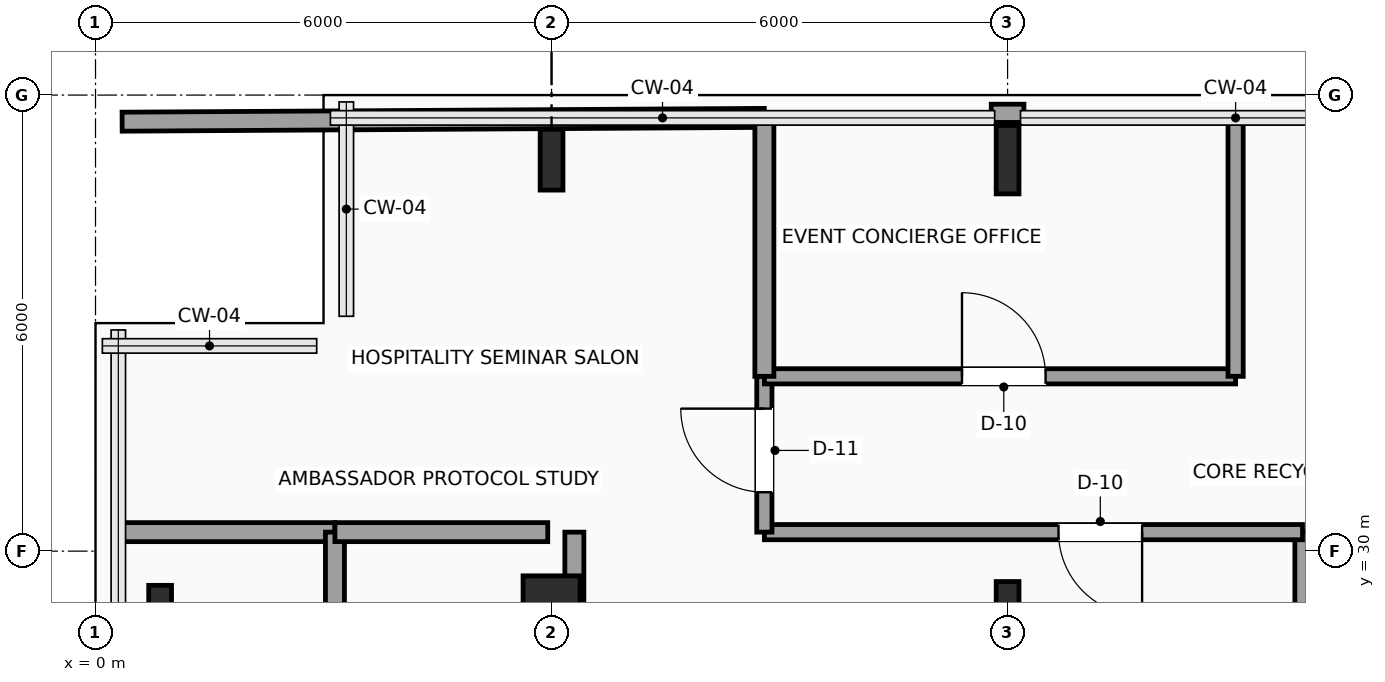
"""IFC4 building model, lengths in metres.
Left out: names, types, materials, properties, quantities, classifications, styles, units other than length and angle.
Written with IfcOpenShell. Run it as: python <this file> out.ifc"""

import sys

from ifc_helpers import new_model, si_unit, direction, frame, frame_2d, origin, origin_2d, place, context, subcontext, project, spatial, rectangle, i_section, extrude, element, fill, save


model = new_model("IFC4")
c1 = context("Model", 3, precision=1e-05, world=origin(), true_north=direction((0.0, 1.0)))
c2 = subcontext(c1, "Body", "Model", "MODEL_VIEW")
j1 = project(units=[si_unit("LENGTHUNIT", "METRE"), si_unit("PLANEANGLEUNIT", "RADIAN")], contexts=[c1])
p1 = place(None, origin())
s1 = spatial("IfcSite", under=j1, at=p1, CompositionType="ELEMENT")
p2 = place(p1, origin())
s2 = spatial("IfcBuilding", under=s1, at=p2, CompositionType="ELEMENT")
p3 = place(p2, frame((0.0, 0.0, 187.95)))
s3 = spatial("IfcBuildingStorey", under=s2, at=p3, CompositionType="ELEMENT", Elevation=187.95)
p4 = place(p3, frame((0.85, 29.15, 0.0), z_axis=(0.0, 0.0, 1.0), x_axis=(1.0, 0.0, 0.0)))
e1 = element("IfcColumn", 1, at=p4, inside=s3, PredefinedType="COLUMN", context=c2, shape_type="SweptSolid", body=[
    extrude(i_section(OverallWidth=0.3, OverallDepth=0.8, WebThickness=0.018, FlangeThickness=0.033, FilletRadius=0.03, at=origin_2d()), origin(), (0.0, 0.0, 1.0), 3.75),
])
p5 = place(p3, frame((6.0, 29.15, 0.0), z_axis=(0.0, 0.0, 1.0), x_axis=(1.0, 0.0, 0.0)))
e2 = element("IfcColumn", 2, at=p5, inside=s3, PredefinedType="COLUMN", context=c2, shape_type="SweptSolid", body=[
    extrude(rectangle(XDim=0.75, YDim=1.05, at=origin_2d()), origin(), (0.0, 0.0, 1.0), 3.75),
])
p6 = place(p3, frame((6.0, 35.15, 0.0), z_axis=(0.0, 0.0, 1.0), x_axis=(1.0, 0.0, 0.0)))
e3 = element("IfcColumn", 3, at=p6, inside=s3, PredefinedType="COLUMN", context=c2, shape_type="SweptSolid", body=[
    extrude(i_section(OverallWidth=0.3, OverallDepth=0.8, WebThickness=0.018, FlangeThickness=0.033, FilletRadius=0.03, at=origin_2d()), origin(), (0.0, 0.0, 1.0), 3.75),
])
for number, where, z_axis, x_axis in (
    (4, (12.0, 29.15, 0.0), (0.0, 0.0, 1.0), (1.0, 0.0, 0.0)),
    (5, (12.0, 35.15, 0.0), (0.0, 0.0, 1.0), (1.0, 0.0, 0.0)),
):
    element("IfcColumn", number, at=place(p3, frame(where, z_axis=z_axis, x_axis=x_axis)), inside=s3, PredefinedType="COLUMN", context=c2, shape_type="SweptSolid", body=[
        extrude(i_section(OverallWidth=0.3, OverallDepth=0.9, WebThickness=0.019, FlangeThickness=0.035, FilletRadius=0.03, at=origin_2d()), origin(), (0.0, 0.0, 1.0), 3.75),
    ])
p7 = place(p3, frame((11.785, 35.76, 0.0), z_axis=(0.0, 0.0, 1.0), x_axis=(1.0, 0.0, 0.0)))
e6 = element("IfcWall", 6, at=p7, inside=s3, PredefinedType="SOLIDWALL", context=c2, shape_type="SweptSolid", body=[
    extrude(rectangle(XDim=0.43, YDim=0.24, at=frame_2d((0.215, 0.0))), origin(), (0.0, 0.0, 1.0), 3.54),
])
p8 = place(p3, frame((15.88, 27.58, 0.0), z_axis=(0.0, 0.0, 1.0), x_axis=(0.0, 1.0, 0.0)))
e7 = element("IfcWall", 7, at=p8, inside=s3, PredefinedType="SOLIDWALL", context=c2, shape_type="SweptSolid", body=[
    extrude(rectangle(XDim=2.67, YDim=0.2, at=frame_2d((1.335, 0.0))), origin(), (0.0, 0.0, 1.0), 3.54),
])
p9 = place(p3, frame((15.88, 30.25, 0.0), z_axis=(0.0, 0.0, 1.0), x_axis=(-1.0, 0.0, 0.0)))
e8 = element("IfcWall", 8, at=p9, inside=s3, PredefinedType="SOLIDWALL", context=c2, shape_type="SweptSolid", body=[
    extrude(rectangle(XDim=7.08, YDim=0.2, at=frame_2d((3.54, 0.0))), origin(), (0.0, 0.0, 1.0), 3.54),
])
p10 = place(p9, frame((2.11, 0.0, 0.0)))
e9 = element("IfcOpeningElement", 9, at=p10, cuts=e8, PredefinedType="OPENING", context=c2, shape_type="SweptSolid", body=[
    extrude(rectangle(XDim=1.1, YDim=2.25, at=frame_2d((0.55, 1.125))), frame((0.0, 0.11, 0.0), z_axis=(0.0, -1.0, 0.0), x_axis=(1.0, 0.0, 0.0)), (0.0, 0.0, 1.0), 0.22),
])
p11 = place(p3, frame((8.8, 30.25, 0.0), z_axis=(0.0, 0.0, 1.0), x_axis=(0.0, 1.0, 0.0)))
e10 = element("IfcWall", 10, at=p11, inside=s3, PredefinedType="SOLIDWALL", context=c2, shape_type="SweptSolid", body=[
    extrude(rectangle(XDim=2.05, YDim=0.2, at=frame_2d((1.025, 0.0))), origin(), (0.0, 0.0, 1.0), 3.54),
])
p12 = place(p11, frame((0.525, 0.0, 0.0)))
e11 = element("IfcOpeningElement", 11, at=p12, cuts=e10, PredefinedType="OPENING", context=c2, shape_type="SweptSolid", body=[
    extrude(rectangle(XDim=1.1, YDim=2.25, at=frame_2d((0.55, 1.125))), frame((0.0, 0.11, 0.0), z_axis=(0.0, -1.0, 0.0), x_axis=(1.0, 0.0, 0.0)), (0.0, 0.0, 1.0), 0.22),
])
p13 = place(p3, frame((8.8, 32.3, 0.0), z_axis=(0.0, 0.0, 1.0), x_axis=(1.0, 0.0, 0.0)))
e12 = element("IfcWall", 12, at=p13, inside=s3, PredefinedType="SOLIDWALL", context=c2, shape_type="SweptSolid", body=[
    extrude(rectangle(XDim=6.2, YDim=0.2, at=frame_2d((3.1, 0.0))), origin(), (0.0, 0.0, 1.0), 3.132),
])
p14 = place(p13, frame((2.6, 0.0, 0.0)))
e13 = element("IfcOpeningElement", 13, at=p14, cuts=e12, PredefinedType="OPENING", context=c2, shape_type="SweptSolid", body=[
    extrude(rectangle(XDim=1.1, YDim=2.25, at=frame_2d((0.55, 1.125))), frame((0.0, 0.11, 0.0), z_axis=(0.0, -1.0, 0.0), x_axis=(1.0, 0.0, 0.0)), (0.0, 0.0, 1.0), 0.22),
])
p15 = place(p3, frame((15.0, 32.3, 0.0), z_axis=(0.0, 0.0, 1.0), x_axis=(0.0, 1.0, 0.0)))
e14 = element("IfcWall", 14, at=p15, inside=s3, PredefinedType="SOLIDWALL", context=c2, shape_type="SweptSolid", body=[
    extrude(rectangle(XDim=3.4, YDim=0.2, at=frame_2d((1.7, 0.0))), origin(), (0.0, 0.0, 1.0), 3.54),
])
p16 = place(p3, frame((0.3, 30.25, 0.0), z_axis=(0.0, 0.0, 1.0), x_axis=(1.0, 0.0, 0.0)))
e15 = element("IfcWall", 15, at=p16, inside=s3, PredefinedType="PARTITIONING", context=c2, shape_type="SweptSolid", body=[
    extrude(rectangle(XDim=2.85, YDim=0.25, at=frame_2d((1.425, 0.0))), origin(), (0.0, 0.0, 1.0), 3.54),
])
p17 = place(p3, frame((3.15, 18.0, 0.0), z_axis=(0.0, 0.0, 1.0), x_axis=(0.0, 1.0, 0.0)))
e16 = element("IfcWall", 16, at=p17, inside=s3, PredefinedType="PARTITIONING", context=c2, shape_type="SweptSolid", body=[
    extrude(rectangle(XDim=12.25, YDim=0.25, at=frame_2d((6.125, 0.0))), origin(), (0.0, 0.0, 1.0), 3.54),
])
p18 = place(p3, frame((3.15, 30.25, 0.0), z_axis=(0.0, 0.0, 1.0), x_axis=(1.0, 0.0, 0.0)))
e17 = element("IfcWall", 17, at=p18, inside=s3, PredefinedType="PARTITIONING", context=c2, shape_type="SweptSolid", body=[
    extrude(rectangle(XDim=2.8, YDim=0.25, at=frame_2d((1.4, 0.0))), origin(), (0.0, 0.0, 1.0), 3.54),
])
p19 = place(p3, frame((6.3, 27.65, 0.0), z_axis=(0.0, 0.0, 1.0), x_axis=(0.0, 1.0, 0.0)))
e18 = element("IfcWall", 18, at=p19, inside=s3, PredefinedType="PARTITIONING", context=c2, shape_type="SweptSolid", body=[
    extrude(rectangle(XDim=2.6, YDim=0.25, at=frame_2d((1.3, 0.0))), origin(), (0.0, 0.0, 1.0), 3.132),
])
p20 = place(p3, frame((0.35, 35.65, 0.0), z_axis=(0.0, 0.0, 1.0), x_axis=(0.99998245966, 0.005922868574, 0.0)))
e19 = element("IfcWall", 19, at=p20, inside=s3, PredefinedType="PARTITIONING", context=c2, shape_type="SweptSolid", body=[
    extrude(rectangle(XDim=8.45, YDim=0.25, at=frame_2d((4.225, 0.0))), origin(), (0.0, 0.0, 1.0), 3.54),
])
p21 = place(p3, frame((8.8, 32.3, 0.0), z_axis=(0.0, 0.0, 1.0), x_axis=(0.0, 1.0, 0.0)))
e20 = element("IfcWall", 20, at=p21, inside=s3, PredefinedType="PARTITIONING", context=c2, shape_type="SweptSolid", body=[
    extrude(rectangle(XDim=3.4, YDim=0.25, at=frame_2d((1.7, 0.0))), origin(), (0.0, 0.0, 1.0), 3.54),
])
p22 = place(p10, origin())
e21 = element("IfcDoor", 21, at=p22, inside=s3, OperationType="SINGLE_SWING_LEFT", PredefinedType="DOOR", context=c2, shape_type="SweptSolid", body=[
    extrude(rectangle(XDim=1.1, YDim=2.25, at=frame_2d((0.55, 1.125))), frame((0.0, 0.025, 0.0), z_axis=(0.0, -1.0, 0.0), x_axis=(1.0, 0.0, 0.0)), (0.0, 0.0, 1.0), 0.05),
])
fill(e9, e21)
p23 = place(p12, origin())
e22 = element("IfcDoor", 22, at=p23, inside=s3, OperationType="SINGLE_SWING_RIGHT", PredefinedType="DOOR", context=c2, shape_type="SweptSolid", body=[
    extrude(rectangle(XDim=1.1, YDim=2.25, at=frame_2d((0.55, 1.125))), frame((0.0, 0.025, 0.0), z_axis=(0.0, -1.0, 0.0), x_axis=(1.0, 0.0, 0.0)), (0.0, 0.0, 1.0), 0.05),
])
fill(e11, e22)
p24 = place(p14, origin())
e23 = element("IfcDoor", 23, at=p24, inside=s3, OperationType="SINGLE_SWING_LEFT", PredefinedType="DOOR", context=c2, shape_type="SweptSolid", body=[
    extrude(rectangle(XDim=1.1, YDim=2.25, at=frame_2d((0.55, 1.125))), frame((0.0, 0.025, 0.0), z_axis=(0.0, -1.0, 0.0), x_axis=(1.0, 0.0, 0.0)), (0.0, 0.0, 1.0), 0.05),
])
fill(e13, e23)
save(model, sys.argv[1])
